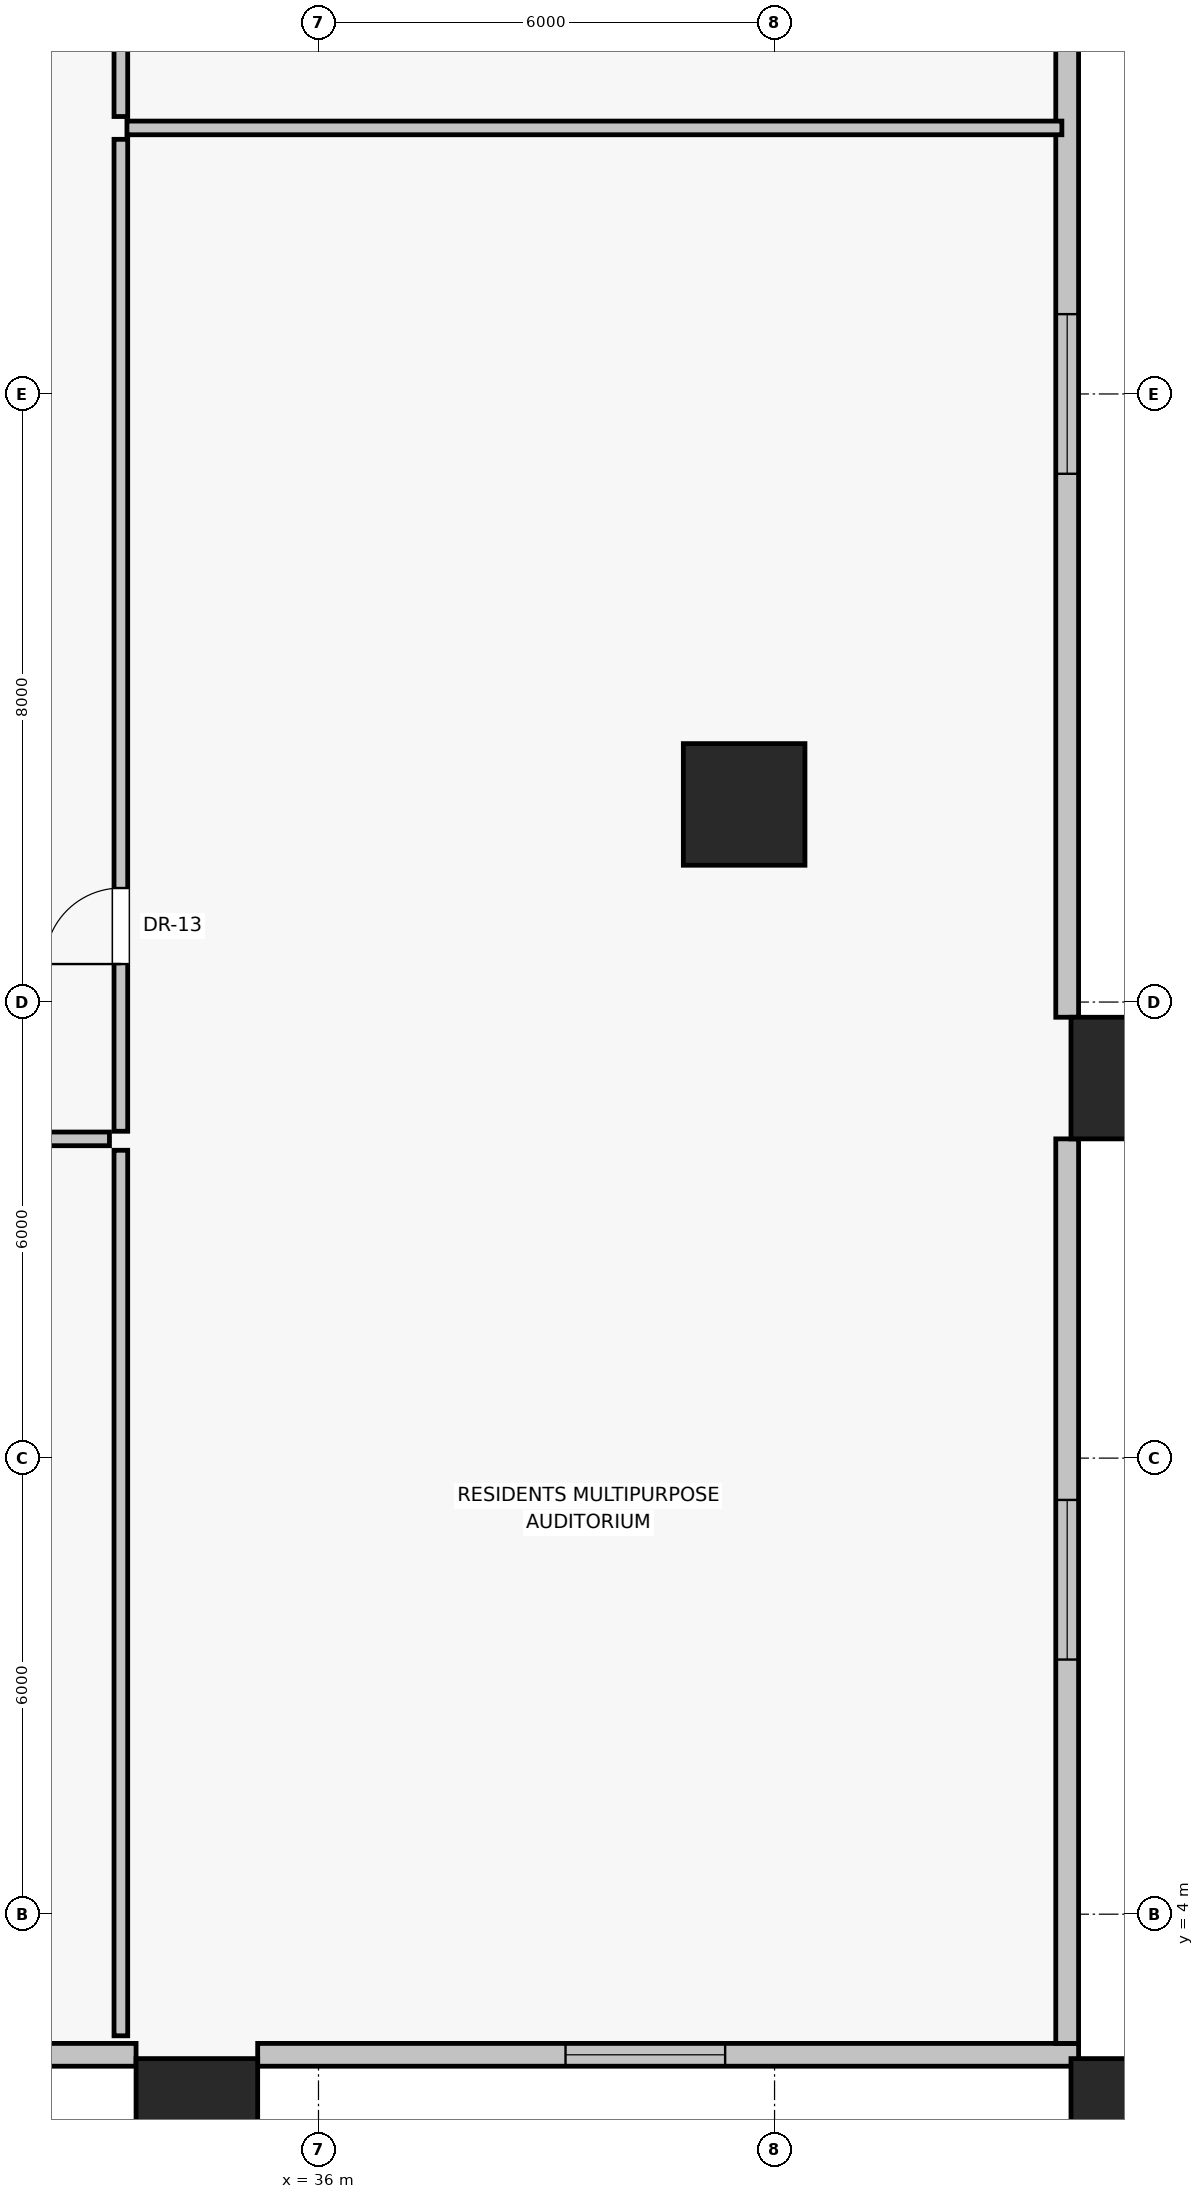
"""IFC4 building model, lengths in metres.
Left out: names, types, materials, properties, quantities, classifications, styles, units other than length and angle.
Written with IfcOpenShell. Run it as: python <this file> out.ifc"""

import sys

from ifc_helpers import new_model, si_unit, direction, frame, frame_2d, origin, origin_2d, place, context, subcontext, project, spatial, rectangle, extrude, source, transform, mapped, element, fill, save


model = new_model("IFC4")
c1 = context("Model", 3, precision=1e-05, world=origin(), true_north=direction((0.0, 1.0)))
c2 = subcontext(c1, "Body", "Model", "MODEL_VIEW")
j1 = project(units=[si_unit("LENGTHUNIT", "METRE"), si_unit("PLANEANGLEUNIT", "RADIAN")], contexts=[c1])
p1 = place(None, origin())
s1 = spatial("IfcSite", under=j1, at=p1, CompositionType="ELEMENT")
p2 = place(p1, origin())
s2 = spatial("IfcBuilding", under=s1, at=p2, CompositionType="ELEMENT")
p3 = place(p2, frame((0.0, 0.0, 9.6)))
s3 = spatial("IfcBuildingStorey", under=s2, at=p3, CompositionType="ELEMENT", Elevation=9.6)
for number, where, z_axis, x_axis in (
    (1, (34.4, 1.3, 0.0), (0.0, 0.0, 1.0), (1.0, 0.0, 0.0)),
    (2, (46.7, 1.3, 0.0), (0.0, 0.0, 1.0), (1.0, 0.0, 0.0)),
    (3, (46.7, 15.0, 0.0), (0.0, 0.0, 1.0), (1.0, 0.0, 0.0)),
    (4, (41.6, 18.6, 0.0), (0.0, 0.0, 1.0), (1.0, 0.0, 0.0)),
):
    element("IfcColumn", number, at=place(p3, frame(where, z_axis=z_axis, x_axis=x_axis)), inside=s3, PredefinedType="COLUMN", context=c2, shape_type="SweptSolid", body=[
        extrude(rectangle(XDim=1.6, YDim=1.6, at=origin_2d()), origin(), (0.0, 0.0, 1.0), 4.4),
    ])
p4 = place(p3, frame((24.8, 2.15, 0.0), z_axis=(0.0, 0.0, 1.0), x_axis=(1.0, 0.0, 0.0)))
e5 = element("IfcWall", 5, at=p4, inside=s3, PredefinedType="SOLIDWALL", context=c2, shape_type="SweptSolid", body=[
    extrude(rectangle(XDim=8.8, YDim=0.3, at=frame_2d((4.4, 0.0))), origin(), (0.0, 0.0, 1.0), 3.0),
])
p5 = place(p4, frame((3.35, 0.0, 0.85)))
e6 = element("IfcOpeningElement", 6, at=p5, cuts=e5, PredefinedType="OPENING", context=c2, shape_type="SweptSolid", body=[
    extrude(rectangle(XDim=2.1, YDim=1.75, at=frame_2d((1.05, 0.875))), frame((0.0, 0.16, 0.0), z_axis=(0.0, -1.0, 0.0), x_axis=(1.0, 0.0, 0.0)), (0.0, 0.0, 1.0), 0.32),
])
p6 = place(p3, frame((35.2, 2.15, 0.0), z_axis=(0.0, 0.0, 1.0), x_axis=(1.0, 0.0, 0.0)))
e7 = element("IfcWall", 7, at=p6, inside=s3, PredefinedType="SOLIDWALL", context=c2, shape_type="SweptSolid", body=[
    extrude(rectangle(XDim=10.8, YDim=0.3, at=frame_2d((5.4, 0.0))), origin(), (0.0, 0.0, 1.0), 3.0),
])
p7 = place(p6, frame((4.05, 0.0, 0.85)))
e8 = element("IfcOpeningElement", 8, at=p7, cuts=e7, PredefinedType="OPENING", context=c2, shape_type="SweptSolid", body=[
    extrude(rectangle(XDim=2.1, YDim=1.75, at=frame_2d((1.05, 0.875))), frame((0.0, 0.16, 0.0), z_axis=(0.0, -1.0, 0.0), x_axis=(1.0, 0.0, 0.0)), (0.0, 0.0, 1.0), 0.32),
])
p8 = place(p3, frame((45.85, 2.3, 0.0), z_axis=(0.0, 0.0, 1.0), x_axis=(0.0, 1.0, 0.0)))
e9 = element("IfcWall", 9, at=p8, inside=s3, PredefinedType="SOLIDWALL", context=c2, shape_type="SweptSolid", body=[
    extrude(rectangle(XDim=11.9, YDim=0.3, at=frame_2d((5.95, 0.0))), origin(), (0.0, 0.0, 1.0), 3.0),
])
p9 = place(p8, frame((5.05, 0.0, 0.85)))
e10 = element("IfcOpeningElement", 10, at=p9, cuts=e9, PredefinedType="OPENING", context=c2, shape_type="SweptSolid", body=[
    extrude(rectangle(XDim=2.1, YDim=1.75, at=frame_2d((1.05, 0.875))), frame((0.0, 0.16, 0.0), z_axis=(0.0, -1.0, 0.0), x_axis=(1.0, 0.0, 0.0)), (0.0, 0.0, 1.0), 0.32),
])
p10 = place(p3, frame((45.85, 15.8, 0.0), z_axis=(0.0, 0.0, 1.0), x_axis=(0.0, 1.0, 0.0)))
e11 = element("IfcWall", 11, at=p10, inside=s3, PredefinedType="SOLIDWALL", context=c2, shape_type="SweptSolid", body=[
    extrude(rectangle(XDim=16.4, YDim=0.3, at=frame_2d((8.2, 0.0))), origin(), (0.0, 0.0, 1.0), 3.0),
])
p11 = place(p10, frame((7.15, 0.0, 0.85)))
e12 = element("IfcOpeningElement", 12, at=p11, cuts=e11, PredefinedType="OPENING", context=c2, shape_type="SweptSolid", body=[
    extrude(rectangle(XDim=2.1, YDim=1.75, at=frame_2d((1.05, 0.875))), frame((0.0, 0.16, 0.0), z_axis=(0.0, -1.0, 0.0), x_axis=(1.0, 0.0, 0.0)), (0.0, 0.0, 1.0), 0.32),
])
p12 = place(p3, frame((28.15, 14.2, 0.0), z_axis=(0.0, 0.0, 1.0), x_axis=(1.0, 0.0, 0.0)))
e13 = element("IfcWall", 13, at=p12, inside=s3, PredefinedType="PARTITIONING", context=c2, shape_type="SweptSolid", body=[
    extrude(rectangle(XDim=5.1, YDim=0.18, at=frame_2d((2.55, 0.0))), origin(), (0.0, 0.0, 1.0), 4.1),
])
p13 = place(p12, frame((2.5, 0.0, 0.0)))
e14 = element("IfcOpeningElement", 14, at=p13, cuts=e13, PredefinedType="OPENING", context=c2, shape_type="SweptSolid", body=[
    extrude(rectangle(XDim=1.0, YDim=2.01, at=frame_2d((0.5, 1.005))), frame((0.0, 0.1, 0.0), z_axis=(0.0, -1.0, 0.0), x_axis=(1.0, 0.0, 0.0)), (0.0, 0.0, 1.0), 0.2),
])
p14 = place(p3, frame((33.4, 2.4, 0.0), z_axis=(0.0, 0.0, 1.0), x_axis=(0.0, 1.0, 0.0)))
e15 = element("IfcWall", 15, at=p14, inside=s3, PredefinedType="PARTITIONING", context=c2, shape_type="SweptSolid", body=[
    extrude(rectangle(XDim=11.65, YDim=0.18, at=frame_2d((5.825, 0.0))), origin(), (0.0, 0.0, 1.0), 4.1),
])
p15 = place(p3, frame((33.4, 14.3, 0.0), z_axis=(0.0, 0.0, 1.0), x_axis=(0.0, 1.0, 0.0)))
e16 = element("IfcWall", 16, at=p15, inside=s3, PredefinedType="PARTITIONING", context=c2, shape_type="SweptSolid", body=[
    extrude(rectangle(XDim=13.05, YDim=0.18, at=frame_2d((6.525, 0.0))), origin(), (0.0, 0.0, 1.0), 4.1),
])
p16 = place(p15, frame((2.2, 0.0, 0.0)))
e17 = element("IfcOpeningElement", 17, at=p16, cuts=e16, PredefinedType="OPENING", context=c2, shape_type="SweptSolid", body=[
    extrude(rectangle(XDim=1.0, YDim=2.01, at=frame_2d((0.5, 1.005))), frame((0.0, 0.1, 0.0), z_axis=(0.0, -1.0, 0.0), x_axis=(1.0, 0.0, 0.0)), (0.0, 0.0, 1.0), 0.2),
])
p17 = place(p3, frame((33.4, 27.65, 0.0), z_axis=(0.0, 0.0, 1.0), x_axis=(0.0, 1.0, 0.0)))
e18 = element("IfcWall", 18, at=p17, inside=s3, PredefinedType="PARTITIONING", context=c2, shape_type="SweptSolid", body=[
    extrude(rectangle(XDim=5.85, YDim=0.18, at=frame_2d((2.925, 0.0))), origin(), (0.0, 0.0, 1.0), 4.1),
])
p18 = place(p17, frame((2.2, 0.0, 0.0)))
e19 = element("IfcOpeningElement", 19, at=p18, cuts=e18, PredefinedType="OPENING", context=c2, shape_type="SweptSolid", body=[
    extrude(rectangle(XDim=1.0, YDim=2.01, at=frame_2d((0.5, 1.005))), frame((0.0, 0.1, 0.0), z_axis=(0.0, -1.0, 0.0), x_axis=(1.0, 0.0, 0.0)), (0.0, 0.0, 1.0), 0.2),
])
p19 = place(p3, frame((33.48, 27.5, 0.0), z_axis=(0.0, 0.0, 1.0), x_axis=(1.0, 0.0, 0.0)))
e20 = element("IfcWall", 20, at=p19, inside=s3, PredefinedType="PARTITIONING", context=c2, shape_type="SweptSolid", body=[
    extrude(rectangle(XDim=12.3, YDim=0.18, at=frame_2d((6.15, 0.0))), origin(), (0.0, 0.0, 1.0), 4.1),
])
m1 = source(origin(), c2, "Body", "SweptSolid", [
    extrude(rectangle(XDim=2.1, YDim=1.75, at=frame_2d((1.05, 0.875))), frame((0.0, 0.03, 0.0), z_axis=(0.0, -1.0, 0.0), x_axis=(1.0, 0.0, 0.0)), (0.0, 0.0, 1.0), 0.06),
])
p20 = place(p7, origin())
e21 = element("IfcWindow", 21, at=p20, inside=s3, PartitioningType="DOUBLE_PANEL_VERTICAL", PredefinedType="WINDOW", context=c2, shape_type="MappedRepresentation", body=[
    mapped(m1, transform((0.0, 0.0, 0.0), scale=1.0)),
])
fill(e8, e21)
p21 = place(p9, origin())
e22 = element("IfcWindow", 22, at=p21, inside=s3, PartitioningType="DOUBLE_PANEL_VERTICAL", PredefinedType="WINDOW", context=c2, shape_type="MappedRepresentation", body=[
    mapped(m1, transform((0.0, 0.0, 0.0), scale=1.0)),
])
fill(e10, e22)
p22 = place(p11, origin())
e23 = element("IfcWindow", 23, at=p22, inside=s3, PartitioningType="DOUBLE_PANEL_VERTICAL", PredefinedType="WINDOW", context=c2, shape_type="MappedRepresentation", body=[
    mapped(m1, transform((0.0, 0.0, 0.0), scale=1.0)),
])
fill(e12, e23)
m2 = source(origin(), c2, "Body", "SweptSolid", [
    extrude(rectangle(XDim=1.0, YDim=2.01, at=frame_2d((0.5, 1.005))), frame((0.0, 0.025, 0.0), z_axis=(0.0, -1.0, 0.0), x_axis=(1.0, 0.0, 0.0)), (0.0, 0.0, 1.0), 0.05),
])
p23 = place(p16, origin())
e24 = element("IfcDoor", 24, at=p23, inside=s3, OperationType="SINGLE_SWING_LEFT", PredefinedType="DOOR", context=c2, shape_type="MappedRepresentation", body=[
    mapped(m2, transform((0.0, 0.0, 0.0), scale=1.0)),
])
fill(e17, e24)
save(model, sys.argv[1])
